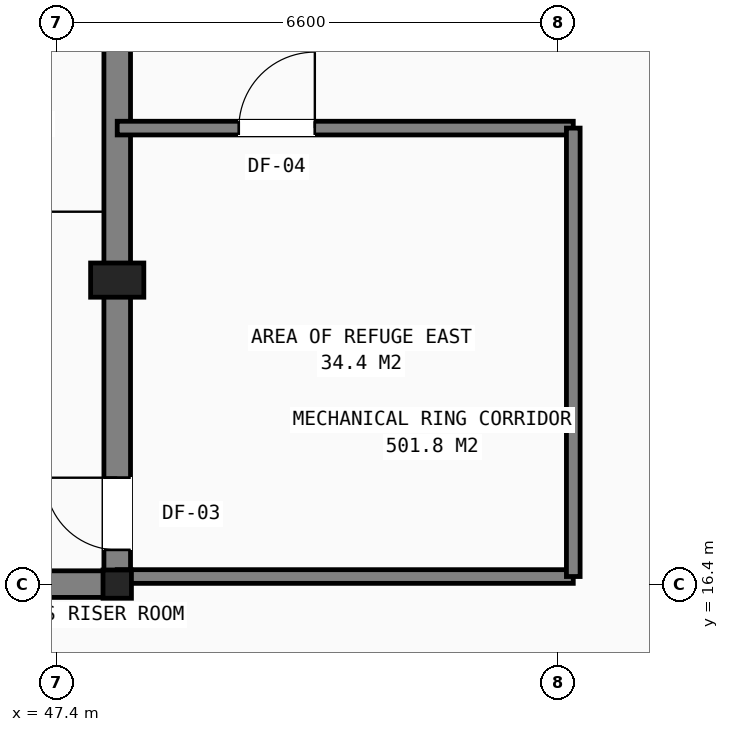
"""IFC4 building model, lengths in metres.
Left out: names, types, materials, properties, quantities, classifications, styles, units other than length and angle.
Written with IfcOpenShell. Run it as: python <this file> out.ifc"""

import sys

from ifc_helpers import new_model, si_unit, direction, frame, frame_2d, origin, origin_2d, place, context, subcontext, project, spatial, rectangle, i_section, extrude, element, fill, save


model = new_model("IFC4")
c1 = context("Model", 3, precision=1e-05, world=origin(), true_north=direction((0.0, 1.0)))
c2 = subcontext(c1, "Body", "Model", "MODEL_VIEW")
j1 = project(units=[si_unit("LENGTHUNIT", "METRE"), si_unit("PLANEANGLEUNIT", "RADIAN")], contexts=[c1])
p1 = place(None, origin())
s1 = spatial("IfcSite", under=j1, at=p1, CompositionType="ELEMENT")
p2 = place(p1, origin())
s2 = spatial("IfcBuilding", under=s1, at=p2, CompositionType="ELEMENT")
p3 = place(p2, frame((0.0, 0.0, 157.4)))
s3 = spatial("IfcBuildingStorey", under=s2, at=p3, CompositionType="ELEMENT", Elevation=157.4)
p4 = place(p3, frame((48.2, 16.4, 0.0), z_axis=(0.0, 0.0, 1.0), x_axis=(1.0, 0.0, 0.0)))
e1 = element("IfcColumn", 1, at=p4, inside=s3, PredefinedType="COLUMN", context=c2, shape_type="SweptSolid", body=[
    extrude(i_section(OverallWidth=0.374, OverallDepth=0.372, WebThickness=0.016, FlangeThickness=0.026, at=origin_2d()), origin(), (0.0, 0.0, 1.0), 4.6),
])
p5 = place(p3, frame((48.2, 20.4, 0.0), z_axis=(0.0, 0.0, 1.0), x_axis=(1.0, 0.0, 0.0)))
e2 = element("IfcColumn", 2, at=p5, inside=s3, PredefinedType="PILASTER", context=c2, shape_type="SweptSolid", body=[
    extrude(rectangle(XDim=0.7, YDim=0.45, at=origin_2d()), origin(), (0.0, 0.0, 1.0), 4.6),
])
p6 = place(p3, frame((31.8, 16.4, 0.0), z_axis=(0.0, 0.0, 1.0), x_axis=(1.0, 0.0, 0.0)))
e3 = element("IfcWall", 3, at=p6, inside=s3, PredefinedType="SHEAR", context=c2, shape_type="SweptSolid", body=[
    extrude(rectangle(XDim=16.4, YDim=0.35, at=frame_2d((8.2, 0.0))), origin(), (0.0, 0.0, 1.0), 4.36),
])
p7 = place(p6, frame((7.75, 0.0, 0.0)))
e4 = element("IfcOpeningElement", 4, at=p7, cuts=e3, PredefinedType="OPENING", context=c2, shape_type="SweptSolid", body=[
    extrude(rectangle(XDim=0.9, YDim=2.1, at=frame_2d((0.45, 1.05))), frame((0.0, 0.185, 0.0), z_axis=(0.0, -1.0, 0.0), x_axis=(1.0, 0.0, 0.0)), (0.0, 0.0, 1.0), 0.37),
])
p8 = place(p6, frame((4.2, 0.0, 0.0)))
e5 = element("IfcOpeningElement", 5, at=p8, cuts=e3, PredefinedType="OPENING", context=c2, shape_type="SweptSolid", body=[
    extrude(rectangle(XDim=0.95, YDim=2.1, at=frame_2d((0.475, 1.05))), frame((0.0, 0.185, 0.0), z_axis=(0.0, -1.0, 0.0), x_axis=(1.0, 0.0, 0.0)), (0.0, 0.0, 1.0), 0.37),
])
p9 = place(p6, frame((10.6, 0.0, 0.0)))
e6 = element("IfcOpeningElement", 6, at=p9, cuts=e3, PredefinedType="OPENING", context=c2, shape_type="SweptSolid", body=[
    extrude(rectangle(XDim=0.95, YDim=2.1, at=frame_2d((0.475, 1.05))), frame((0.0, 0.185, 0.0), z_axis=(0.0, -1.0, 0.0), x_axis=(1.0, 0.0, 0.0)), (0.0, 0.0, 1.0), 0.37),
])
p10 = place(p3, frame((48.2, 16.4, 0.0), z_axis=(0.0, 0.0, 1.0), x_axis=(0.0, 1.0, 0.0)))
e7 = element("IfcWall", 7, at=p10, inside=s3, PredefinedType="SHEAR", context=c2, shape_type="SweptSolid", body=[
    extrude(rectangle(XDim=14.8, YDim=0.35, at=frame_2d((7.4, 0.0))), origin(), (0.0, 0.0, 1.0), 4.36),
])
p11 = place(p10, frame((11.0, 0.0, 0.0)))
e8 = element("IfcOpeningElement", 8, at=p11, cuts=e7, PredefinedType="OPENING", context=c2, shape_type="SweptSolid", body=[
    extrude(rectangle(XDim=1.1, YDim=2.15, at=frame_2d((0.55, 1.075))), frame((0.0, 0.185, 0.0), z_axis=(0.0, -1.0, 0.0), x_axis=(1.0, 0.0, 0.0)), (0.0, 0.0, 1.0), 0.37),
])
p12 = place(p10, frame((0.45, 0.0, 0.0)))
e9 = element("IfcOpeningElement", 9, at=p12, cuts=e7, PredefinedType="OPENING", context=c2, shape_type="SweptSolid", body=[
    extrude(rectangle(XDim=0.95, YDim=2.1, at=frame_2d((0.475, 1.05))), frame((0.0, 0.185, 0.0), z_axis=(0.0, -1.0, 0.0), x_axis=(1.0, 0.0, 0.0)), (0.0, 0.0, 1.0), 0.37),
])
p13 = place(p3, frame((48.2, 16.5, 0.0), z_axis=(0.0, 0.0, 1.0), x_axis=(1.0, 0.0, 0.0)))
e10 = element("IfcWall", 10, at=p13, inside=s3, PredefinedType="PARTITIONING", context=c2, shape_type="SweptSolid", body=[
    extrude(rectangle(XDim=6.0, YDim=0.18, at=frame_2d((3.0, 0.0))), origin(), (0.0, 0.0, 1.0), 3.811),
])
p14 = place(p3, frame((48.2, 22.4, 0.0), z_axis=(0.0, 0.0, 1.0), x_axis=(1.0, 0.0, 0.0)))
e11 = element("IfcWall", 11, at=p14, inside=s3, PredefinedType="PARTITIONING", context=c2, shape_type="SweptSolid", body=[
    extrude(rectangle(XDim=6.0, YDim=0.18, at=frame_2d((3.0, 0.0))), origin(), (0.0, 0.0, 1.0), 3.811),
])
p15 = place(p14, frame((1.6, 0.0, 0.0)))
e12 = element("IfcOpeningElement", 12, at=p15, cuts=e11, PredefinedType="OPENING", context=c2, shape_type="SweptSolid", body=[
    extrude(rectangle(XDim=1.0, YDim=2.15, at=frame_2d((0.5, 1.075))), frame((0.0, 0.1, 0.0), z_axis=(0.0, -1.0, 0.0), x_axis=(1.0, 0.0, 0.0)), (0.0, 0.0, 1.0), 0.2),
])
p16 = place(p3, frame((54.2, 16.5, 0.0), z_axis=(0.0, 0.0, 1.0), x_axis=(0.0, 1.0, 0.0)))
e13 = element("IfcWall", 13, at=p16, inside=s3, PredefinedType="PARTITIONING", context=c2, shape_type="SweptSolid", body=[
    extrude(rectangle(XDim=5.9, YDim=0.18, at=frame_2d((2.95, 0.0))), origin(), (0.0, 0.0, 1.0), 4.36),
])
p17 = place(p12, origin())
e14 = element("IfcDoor", 14, at=p17, inside=s3, OperationType="SINGLE_SWING_RIGHT", PredefinedType="DOOR", context=c2, shape_type="SweptSolid", body=[
    extrude(rectangle(XDim=0.95, YDim=2.1, at=frame_2d((0.475, 1.05))), frame((0.0, 0.025, 0.0), z_axis=(0.0, -1.0, 0.0), x_axis=(1.0, 0.0, 0.0)), (0.0, 0.0, 1.0), 0.05),
])
fill(e9, e14)
p18 = place(p15, origin())
e15 = element("IfcDoor", 15, at=p18, inside=s3, OperationType="SINGLE_SWING_RIGHT", PredefinedType="DOOR", context=c2, shape_type="SweptSolid", body=[
    extrude(rectangle(XDim=1.0, YDim=2.15, at=frame_2d((0.5, 1.075))), frame((0.0, 0.025, 0.0), z_axis=(0.0, -1.0, 0.0), x_axis=(1.0, 0.0, 0.0)), (0.0, 0.0, 1.0), 0.05),
])
fill(e12, e15)
save(model, sys.argv[1])
